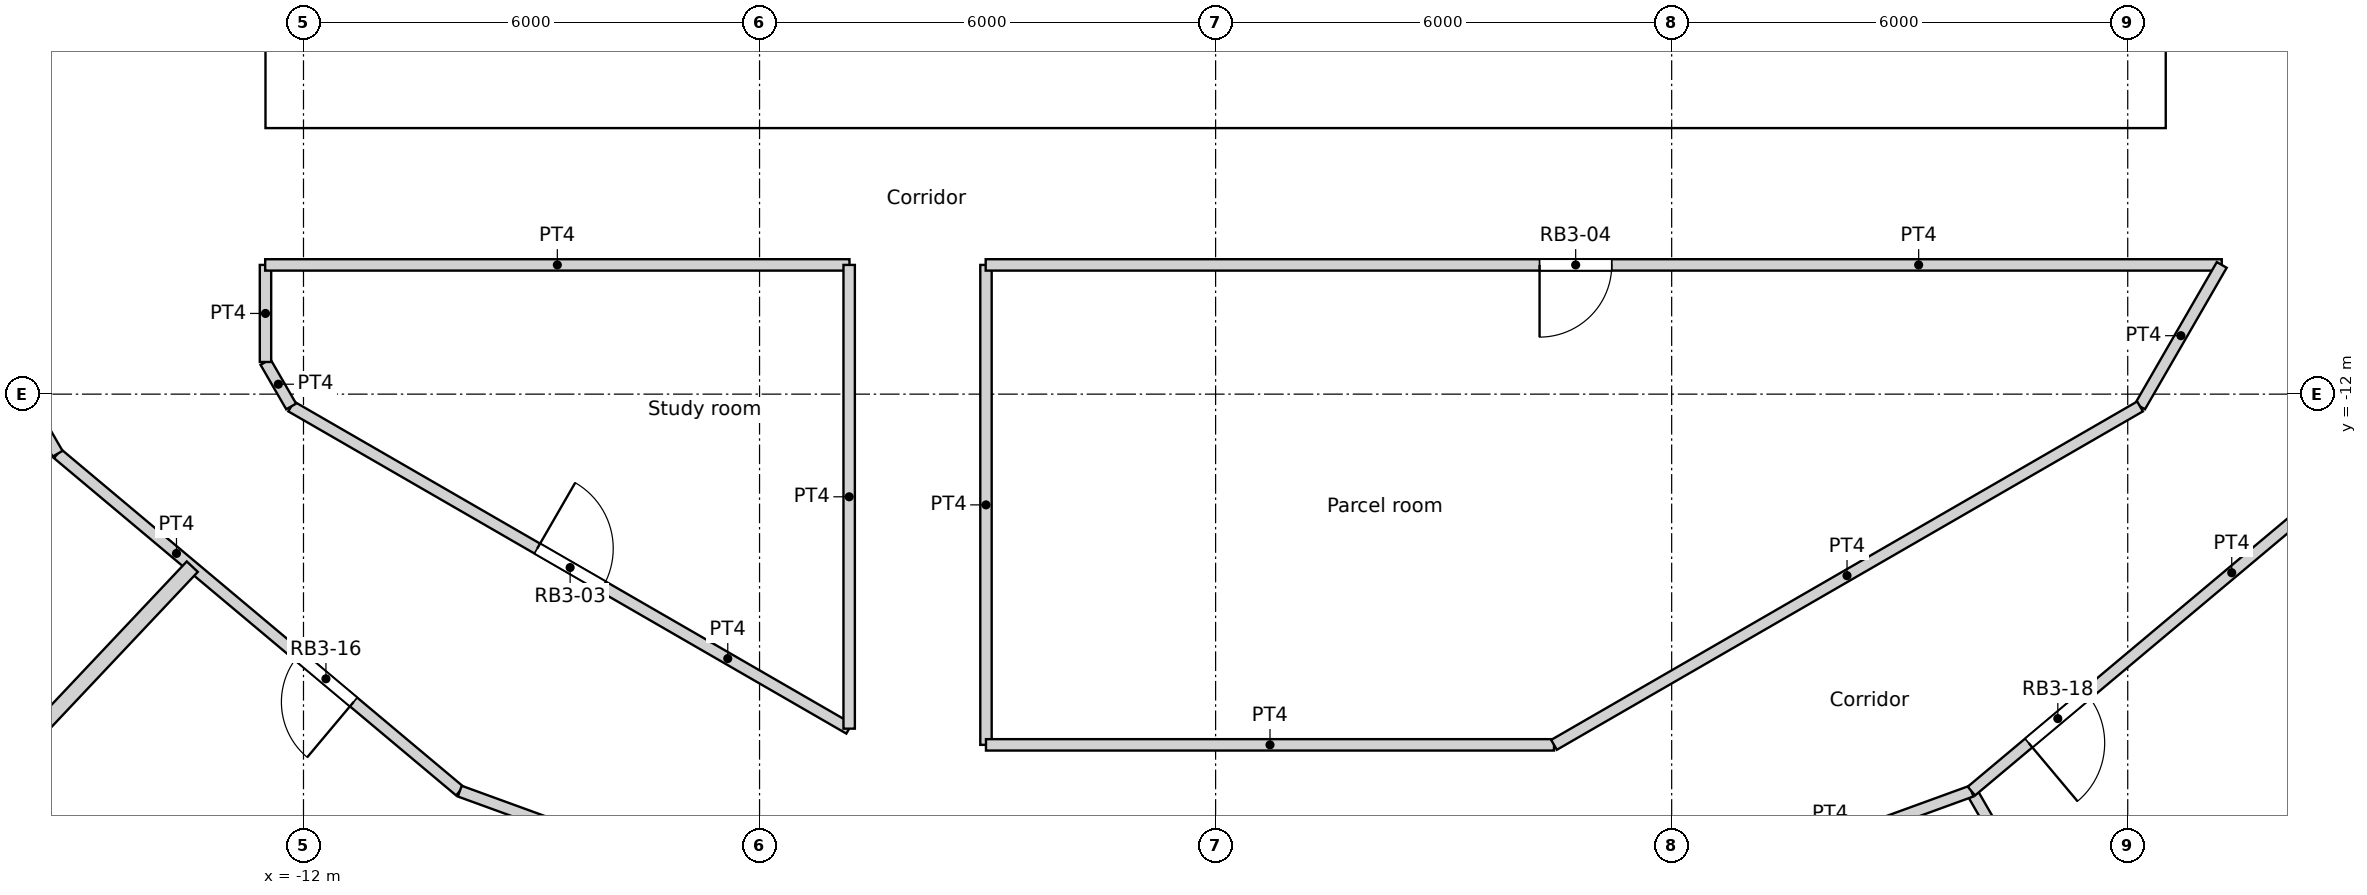
"""IFC4 building model, lengths in metres.
Left out: names, types, materials, properties, quantities, classifications, styles, units other than length and angle.
Written with IfcOpenShell. Run it as: python <this file> out.ifc"""

import sys

from ifc_helpers import new_model, si_unit, direction, frame, frame_2d, origin, origin_2d, place, context, subcontext, project, spatial, rectangle, circle, extrude, element, fill, save


model = new_model("IFC4")
c1 = context("Model", 3, precision=1e-05, world=origin(), true_north=direction((0.0, 1.0)))
c2 = subcontext(c1, "Body", "Model", "MODEL_VIEW")
j1 = project(units=[si_unit("LENGTHUNIT", "METRE"), si_unit("PLANEANGLEUNIT", "RADIAN")], contexts=[c1])
p1 = place(None, origin())
s1 = spatial("IfcSite", under=j1, at=p1, CompositionType="ELEMENT")
p2 = place(p1, origin())
s2 = spatial("IfcBuilding", under=s1, at=p2, CompositionType="ELEMENT")
p3 = place(p2, frame((0.0, 0.0, 147.6)))
s3 = spatial("IfcBuildingStorey", under=s2, at=p3, CompositionType="ELEMENT", Elevation=147.6)
for number, where, z_axis, x_axis in (
    (1, (-13.798, -12.802, 0.0), (0.0, 0.0, 1.0), (1.0, 0.0, 0.0)),
    (2, (-9.411, -16.301, 0.0), (0.0, 0.0, 1.0), (1.0, 0.0, 0.0)),
    (3, (6.876, -17.521, 0.0), (0.0, 0.0, 1.0), (1.0, 0.0, 0.0)),
    (4, (11.735, -14.716, 0.0), (0.0, 0.0, 1.0), (1.0, 0.0, 0.0)),
):
    element("IfcColumn", number, at=place(p3, frame(where, z_axis=z_axis, x_axis=x_axis)), inside=s3, PredefinedType="COLUMN", context=c2, shape_type="SweptSolid", body=[
        extrude(circle(Radius=0.65, at=origin_2d()), origin(), (0.0, 0.0, 1.0), 3.6),
    ])
p4 = place(p3, frame((-12.5, -8.05, 0.0), z_axis=(0.0, 0.0, 1.0), x_axis=(1.0, 0.0, 0.0)))
e5 = element("IfcWall", 5, at=p4, inside=s3, PredefinedType="SOLIDWALL", context=c2, shape_type="SweptSolid", body=[
    extrude(rectangle(XDim=25.0, YDim=0.9, at=frame_2d((12.5, 0.0))), origin(), (0.0, 0.0, 1.0), 3.6),
])
p5 = place(p4, frame((13.4, 0.0, 0.0)))
e6 = element("IfcOpeningElement", 6, at=p5, cuts=e5, PredefinedType="OPENING", context=c2, shape_type="SweptSolid", body=[
    extrude(rectangle(XDim=1.0, YDim=2.1, at=frame_2d((0.5, 1.05))), frame((0.0, 0.45, 0.0), z_axis=(0.0, -1.0, 0.0), x_axis=(1.0, 0.0, 0.0)), (0.0, 0.0, 1.0), 0.9),
])
p6 = place(p4, frame((8.3, 0.0, 0.0)))
e7 = element("IfcOpeningElement", 7, at=p6, cuts=e5, PredefinedType="OPENING", context=c2, shape_type="SweptSolid", body=[
    extrude(rectangle(XDim=1.8, YDim=2.1, at=frame_2d((0.9, 1.05))), frame((0.0, 0.45, 0.0), z_axis=(0.0, -1.0, 0.0), x_axis=(1.0, 0.0, 0.0)), (0.0, 0.0, 1.0), 0.9),
])
p7 = place(p4, frame((14.9, 0.0, 0.0)))
e8 = element("IfcOpeningElement", 8, at=p7, cuts=e5, PredefinedType="OPENING", context=c2, shape_type="SweptSolid", body=[
    extrude(rectangle(XDim=1.8, YDim=2.1, at=frame_2d((0.9, 1.05))), frame((0.0, 0.45, 0.0), z_axis=(0.0, -1.0, 0.0), x_axis=(1.0, 0.0, 0.0)), (0.0, 0.0, 1.0), 0.9),
])
p8 = place(p3, frame((-12.05, -7.6, 0.0), z_axis=(0.0, 0.0, 1.0), x_axis=(0.0, 1.0, 0.0)))
e9 = element("IfcWall", 9, at=p8, inside=s3, PredefinedType="SOLIDWALL", context=c2, shape_type="SweptSolid", body=[
    extrude(rectangle(XDim=15.2, YDim=0.9, at=frame_2d((7.6, 0.0))), origin(), (0.0, 0.0, 1.0), 3.6),
])
p9 = place(p8, frame((7.1, 0.0, 0.0)))
e10 = element("IfcOpeningElement", 10, at=p9, cuts=e9, PredefinedType="OPENING", context=c2, shape_type="SweptSolid", body=[
    extrude(rectangle(XDim=1.0, YDim=2.1, at=frame_2d((0.5, 1.05))), frame((0.0, 0.45, 0.0), z_axis=(0.0, -1.0, 0.0), x_axis=(1.0, 0.0, 0.0)), (0.0, 0.0, 1.0), 0.9),
])
p10 = place(p3, frame((12.05, -7.6, 0.0), z_axis=(0.0, 0.0, 1.0), x_axis=(0.0, 1.0, 0.0)))
e11 = element("IfcWall", 11, at=p10, inside=s3, PredefinedType="SOLIDWALL", context=c2, shape_type="SweptSolid", body=[
    extrude(rectangle(XDim=15.2, YDim=0.9, at=frame_2d((7.6, 0.0))), origin(), (0.0, 0.0, 1.0), 3.6),
])
p11 = place(p10, frame((5.1, 0.0, 0.0)))
e12 = element("IfcOpeningElement", 12, at=p11, cuts=e11, PredefinedType="OPENING", context=c2, shape_type="SweptSolid", body=[
    extrude(rectangle(XDim=1.0, YDim=2.1, at=frame_2d((0.5, 1.05))), frame((0.0, 0.45, 0.0), z_axis=(0.0, -1.0, 0.0), x_axis=(1.0, 0.0, 0.0)), (0.0, 0.0, 1.0), 0.9),
])
for number, where, z_axis, x_axis in (
    (13, (0.55, -7.6, 0.0), (0.0, 0.0, 1.0), (0.0, 1.0, 0.0)),
    (14, (2.25, -7.6, 0.0), (0.0, 0.0, 1.0), (0.0, 1.0, 0.0)),
):
    element("IfcWall", number, at=place(p3, frame(where, z_axis=z_axis, x_axis=x_axis)), inside=s3, PredefinedType="SOLIDWALL", context=c2, shape_type="SweptSolid", body=[
        extrude(rectangle(XDim=4.35, YDim=0.3, at=frame_2d((2.175, 0.0))), origin(), (0.0, 0.0, 1.0), 3.3),
    ])
p12 = place(p3, frame((-9.05, -7.15, 0.0), z_axis=(0.0, 0.0, 1.0), x_axis=(1.0, 0.0, 0.0)))
e15 = element("IfcWall", 15, at=p12, inside=s3, PredefinedType="SOLIDWALL", context=c2, shape_type="SweptSolid", body=[
    extrude(rectangle(XDim=4.85, YDim=0.9, at=frame_2d((2.425, 0.0))), origin(), (0.0, 0.0, 1.0), 3.3),
])
p13 = place(p3, frame((-2.4, -7.15, 0.0), z_axis=(0.0, 0.0, 1.0), x_axis=(1.0, 0.0, 0.0)))
e16 = element("IfcWall", 16, at=p13, inside=s3, PredefinedType="SOLIDWALL", context=c2, shape_type="SweptSolid", body=[
    extrude(rectangle(XDim=2.8, YDim=0.9, at=frame_2d((1.4, 0.0))), origin(), (0.0, 0.0, 1.0), 3.3),
])
p14 = place(p3, frame((4.2, -7.15, 0.0), z_axis=(0.0, 0.0, 1.0), x_axis=(1.0, 0.0, 0.0)))
e17 = element("IfcWall", 17, at=p14, inside=s3, PredefinedType="SOLIDWALL", context=c2, shape_type="SweptSolid", body=[
    extrude(rectangle(XDim=4.85, YDim=0.9, at=frame_2d((2.425, 0.0))), origin(), (0.0, 0.0, 1.0), 3.3),
])
p15 = place(p3, frame((-12.504, -10.3, 0.0), z_axis=(0.0, 0.0, 1.0), x_axis=(1.0, 0.0, 0.0)))
e18 = element("IfcWall", 18, at=p15, inside=s3, PredefinedType="PARTITIONING", context=c2, shape_type="SweptSolid", body=[
    extrude(rectangle(XDim=7.687, YDim=0.15, at=frame_2d((3.844, 0.0))), origin(), (0.0, 0.0, 1.0), 3.3),
])
p16 = place(p3, frame((-3.025, -10.3, 0.0), z_axis=(0.0, 0.0, 1.0), x_axis=(1.0, 0.0, 0.0)))
e19 = element("IfcWall", 19, at=p16, inside=s3, PredefinedType="PARTITIONING", context=c2, shape_type="SweptSolid", body=[
    extrude(rectangle(XDim=16.262, YDim=0.15, at=frame_2d((8.131, 0.0))), origin(), (0.0, 0.0, 1.0), 3.3),
])
p17 = place(p16, frame((7.287, 0.0, 0.0)))
e20 = element("IfcOpeningElement", 20, at=p17, cuts=e19, PredefinedType="OPENING", context=c2, shape_type="SweptSolid", body=[
    extrude(rectangle(XDim=0.95, YDim=2.1, at=frame_2d((0.475, 1.05))), frame((0.0, 0.075, 0.0), z_axis=(0.0, -1.0, 0.0), x_axis=(1.0, 0.0, 0.0)), (0.0, 0.0, 1.0), 0.15),
])
p18 = place(p3, frame((12.162, -12.162, 0.0), z_axis=(0.0, 0.0, 1.0), x_axis=(0.499961633463, 0.866047553582, 0.0)))
e21 = element("IfcWall", 21, at=p18, inside=s3, PredefinedType="PARTITIONING", context=c2, shape_type="SweptSolid", body=[
    extrude(rectangle(XDim=2.15, YDim=0.15, at=frame_2d((1.075, 0.0))), origin(), (0.0, 0.0, 1.0), 3.3),
])
p19 = place(p3, frame((9.943, -17.222, 0.0), z_axis=(0.0, 0.0, 1.0), x_axis=(0.766192104565, 0.642611592567, 0.0)))
e22 = element("IfcWall", 22, at=p19, inside=s3, PredefinedType="PARTITIONING", context=c2, shape_type="SweptSolid", body=[
    extrude(rectangle(XDim=6.906, YDim=0.15, at=frame_2d((3.453, 0.0))), origin(), (0.0, 0.0, 1.0), 3.3),
])
p20 = place(p19, frame((0.984, 0.0, 0.0)))
e23 = element("IfcOpeningElement", 23, at=p20, cuts=e22, PredefinedType="OPENING", context=c2, shape_type="SweptSolid", body=[
    extrude(rectangle(XDim=1.0, YDim=2.04, at=frame_2d((0.5, 1.02))), frame((0.0, 0.075, 0.0), z_axis=(0.0, -1.0, 0.0), x_axis=(1.0, 0.0, 0.0)), (0.0, 0.0, 1.0), 0.15),
])
p21 = place(p3, frame((-12.5, -11.577, 0.0), z_axis=(0.0, 0.0, 1.0), x_axis=(0.0, 1.0, 0.0)))
e24 = element("IfcWall", 24, at=p21, inside=s3, PredefinedType="PARTITIONING", context=c2, shape_type="SweptSolid", body=[
    extrude(rectangle(XDim=1.277, YDim=0.15, at=frame_2d((0.638, 0.0))), origin(), (0.0, 0.0, 1.0), 3.3),
])
p22 = place(p3, frame((-12.5, -11.577, 0.0), z_axis=(0.0, 0.0, 1.0), x_axis=(0.500024767483, -0.866011103799, 0.0)))
e25 = element("IfcWall", 25, at=p22, inside=s3, PredefinedType="PARTITIONING", context=c2, shape_type="SweptSolid", body=[
    extrude(rectangle(XDim=0.676, YDim=0.15, at=frame_2d((0.338, 0.0))), origin(), (0.0, 0.0, 1.0), 3.3),
])
p23 = place(p3, frame((-15.235, -12.784, 0.0), z_axis=(0.0, 0.0, 1.0), x_axis=(0.766192104565, -0.642611592567, 0.0)))
e26 = element("IfcWall", 26, at=p23, inside=s3, PredefinedType="PARTITIONING", context=c2, shape_type="SweptSolid", body=[
    extrude(rectangle(XDim=6.906, YDim=0.15, at=frame_2d((3.453, 0.0))), origin(), (0.0, 0.0, 1.0), 3.3),
])
p24 = place(p23, frame((4.133, 0.0, 0.0)))
e27 = element("IfcOpeningElement", 27, at=p24, cuts=e26, PredefinedType="OPENING", context=c2, shape_type="SweptSolid", body=[
    extrude(rectangle(XDim=0.95, YDim=2.1, at=frame_2d((0.475, 1.05))), frame((0.0, 0.075, 0.0), z_axis=(0.0, -1.0, 0.0), x_axis=(1.0, 0.0, 0.0)), (0.0, 0.0, 1.0), 0.15),
])
p25 = place(p3, frame((-18.688, -6.802, 0.0), z_axis=(0.0, 0.0, 1.0), x_axis=(0.499914202267, -0.866074933462, 0.0)))
e28 = element("IfcWall", 28, at=p25, inside=s3, PredefinedType="PARTITIONING", context=c2, shape_type="SweptSolid", body=[
    extrude(rectangle(XDim=6.907, YDim=0.15, at=frame_2d((3.454, 0.0))), origin(), (0.0, 0.0, 1.0), 3.3),
])
p26 = place(p25, frame((3.028, 0.0, 0.0)))
e29 = element("IfcOpeningElement", 29, at=p26, cuts=e28, PredefinedType="OPENING", context=c2, shape_type="SweptSolid", body=[
    extrude(rectangle(XDim=0.95, YDim=2.1, at=frame_2d((0.475, 1.05))), frame((0.0, 0.075, 0.0), z_axis=(0.0, -1.0, 0.0), x_axis=(1.0, 0.0, 0.0)), (0.0, 0.0, 1.0), 0.15),
])
p27 = place(p3, frame((-12.162, -12.162, 0.0), z_axis=(0.0, 0.0, 1.0), x_axis=(0.866004766557, -0.500035743023, 0.0)))
e30 = element("IfcWall", 30, at=p27, inside=s3, PredefinedType="PARTITIONING", context=c2, shape_type="SweptSolid", body=[
    extrude(rectangle(XDim=8.477, YDim=0.15, at=frame_2d((4.239, 0.0))), origin(), (0.0, 0.0, 1.0), 3.3),
])
p28 = place(p27, frame((3.738, 0.0, 0.0)))
e31 = element("IfcOpeningElement", 31, at=p28, cuts=e30, PredefinedType="OPENING", context=c2, shape_type="SweptSolid", body=[
    extrude(rectangle(XDim=1.0, YDim=2.04, at=frame_2d((0.5, 1.02))), frame((0.0, 0.075, 0.0), z_axis=(0.0, -1.0, 0.0), x_axis=(1.0, 0.0, 0.0)), (0.0, 0.0, 1.0), 0.15),
])
p29 = place(p3, frame((-4.821, -16.401, 0.0), z_axis=(0.0, 0.0, 1.0), x_axis=(0.0, 1.0, 0.0)))
e32 = element("IfcWall", 32, at=p29, inside=s3, PredefinedType="PARTITIONING", context=c2, shape_type="SweptSolid", body=[
    extrude(rectangle(XDim=6.101, YDim=0.15, at=frame_2d((3.05, 0.0))), origin(), (0.0, 0.0, 1.0), 3.3),
])
p30 = place(p3, frame((-3.021, -16.614, 0.0), z_axis=(0.0, 0.0, 1.0), x_axis=(0.0, 1.0, 0.0)))
e33 = element("IfcWall", 33, at=p30, inside=s3, PredefinedType="PARTITIONING", context=c2, shape_type="SweptSolid", body=[
    extrude(rectangle(XDim=6.314, YDim=0.15, at=frame_2d((3.157, 0.0))), origin(), (0.0, 0.0, 1.0), 3.3),
])
p31 = place(p3, frame((-3.021, -16.614, 0.0), z_axis=(0.0, 0.0, 1.0), x_axis=(1.0, 0.0, 0.0)))
e34 = element("IfcWall", 34, at=p31, inside=s3, PredefinedType="PARTITIONING", context=c2, shape_type="SweptSolid", body=[
    extrude(rectangle(XDim=7.473, YDim=0.15, at=frame_2d((3.736, 0.0))), origin(), (0.0, 0.0, 1.0), 3.3),
])
p32 = place(p3, frame((4.452, -16.614, 0.0), z_axis=(0.0, 0.0, 1.0), x_axis=(0.866005203721, 0.500034985904, 0.0)))
e35 = element("IfcWall", 35, at=p32, inside=s3, PredefinedType="PARTITIONING", context=c2, shape_type="SweptSolid", body=[
    extrude(rectangle(XDim=8.903, YDim=0.15, at=frame_2d((4.452, 0.0))), origin(), (0.0, 0.0, 1.0), 3.3),
])
p33 = place(p3, frame((-9.944, -17.223, 0.0), z_axis=(0.0, 0.0, 1.0), x_axis=(0.939737689664, -0.341896292208, 0.0)))
e36 = element("IfcWall", 36, at=p33, inside=s3, PredefinedType="PARTITIONING", context=c2, shape_type="SweptSolid", body=[
    extrude(rectangle(XDim=6.908, YDim=0.15, at=frame_2d((3.454, 0.0))), origin(), (0.0, 0.0, 1.0), 3.3),
])
p34 = place(p3, frame((3.453, -19.586, 0.0), z_axis=(0.0, 0.0, 1.0), x_axis=(0.939672634566, 0.342075050021, 0.0)))
e37 = element("IfcWall", 37, at=p34, inside=s3, PredefinedType="PARTITIONING", context=c2, shape_type="SweptSolid", body=[
    extrude(rectangle(XDim=6.908, YDim=0.15, at=frame_2d((3.454, 0.0))), origin(), (0.0, 0.0, 1.0), 3.3),
])
p35 = place(p34, frame((1.904, 0.0, 0.0)))
e38 = element("IfcOpeningElement", 38, at=p35, cuts=e37, PredefinedType="OPENING", context=c2, shape_type="SweptSolid", body=[
    extrude(rectangle(XDim=1.0, YDim=2.04, at=frame_2d((0.5, 1.02))), frame((0.0, 0.075, 0.0), z_axis=(0.0, -1.0, 0.0), x_axis=(1.0, 0.0, 0.0)), (0.0, 0.0, 1.0), 0.15),
])
p36 = place(p3, frame((-17.497, -18.546, 0.0), z_axis=(0.0, 0.0, 1.0), x_axis=(0.6862502776, 0.72736549031, 0.0)))
e39 = element("IfcWall", 39, at=p36, inside=s3, PredefinedType="PARTITIONING", context=c2, shape_type="SweptSolid", body=[
    extrude(rectangle(XDim=5.879, YDim=0.2, at=frame_2d((2.939, 0.0))), origin(), (0.0, 0.0, 1.0), 3.3),
])
p37 = place(p3, frame((9.944, -17.223, 0.0), z_axis=(0.0, 0.0, 1.0), x_axis=(0.500010020406, -0.866019618423, 0.0)))
e40 = element("IfcWall", 40, at=p37, inside=s3, PredefinedType="PARTITIONING", context=c2, shape_type="SweptSolid", body=[
    extrude(rectangle(XDim=5.61, YDim=0.15, at=frame_2d((2.805, 0.0))), origin(), (0.0, 0.0, 1.0), 3.3),
])
p38 = place(p5, origin())
e41 = element("IfcDoor", 41, at=p38, inside=s3, OperationType="SINGLE_SWING_LEFT", PredefinedType="DOOR", context=c2, shape_type="SweptSolid", body=[
    extrude(rectangle(XDim=1.0, YDim=2.1, at=frame_2d((0.5, 1.05))), frame((0.0, 0.025, 0.0), z_axis=(0.0, -1.0, 0.0), x_axis=(1.0, 0.0, 0.0)), (0.0, 0.0, 1.0), 0.05),
])
fill(e6, e41)
p39 = place(p6, origin())
e42 = element("IfcDoor", 42, at=p39, inside=s3, OperationType="DOUBLE_DOOR_SINGLE_SWING", PredefinedType="DOOR", context=c2, shape_type="SweptSolid", body=[
    extrude(rectangle(XDim=1.8, YDim=2.1, at=frame_2d((0.9, 1.05))), frame((0.0, 0.025, 0.0), z_axis=(0.0, -1.0, 0.0), x_axis=(1.0, 0.0, 0.0)), (0.0, 0.0, 1.0), 0.05),
])
fill(e7, e42)
p40 = place(p7, origin())
e43 = element("IfcDoor", 43, at=p40, inside=s3, OperationType="DOUBLE_DOOR_SINGLE_SWING", PredefinedType="DOOR", context=c2, shape_type="SweptSolid", body=[
    extrude(rectangle(XDim=1.8, YDim=2.1, at=frame_2d((0.9, 1.05))), frame((0.0, 0.025, 0.0), z_axis=(0.0, -1.0, 0.0), x_axis=(1.0, 0.0, 0.0)), (0.0, 0.0, 1.0), 0.05),
])
fill(e8, e43)
p41 = place(p28, origin())
e44 = element("IfcDoor", 44, at=p41, inside=s3, OperationType="SINGLE_SWING_LEFT", PredefinedType="DOOR", context=c2, shape_type="SweptSolid", body=[
    extrude(rectangle(XDim=1.0, YDim=2.04, at=frame_2d((0.5, 1.02))), frame((0.0, 0.025, 0.0), z_axis=(0.0, -1.0, 0.0), x_axis=(1.0, 0.0, 0.0)), (0.0, 0.0, 1.0), 0.05),
])
fill(e31, e44)
p42 = place(p17, origin())
e45 = element("IfcDoor", 45, at=p42, inside=s3, OperationType="SINGLE_SWING_RIGHT", PredefinedType="DOOR", context=c2, shape_type="SweptSolid", body=[
    extrude(rectangle(XDim=0.95, YDim=2.1, at=frame_2d((0.475, 1.05))), frame((0.0, 0.025, 0.0), z_axis=(0.0, -1.0, 0.0), x_axis=(1.0, 0.0, 0.0)), (0.0, 0.0, 1.0), 0.05),
])
fill(e20, e45)
p43 = place(p24, origin())
e46 = element("IfcDoor", 46, at=p43, inside=s3, OperationType="SINGLE_SWING_LEFT", PredefinedType="DOOR", context=c2, shape_type="SweptSolid", body=[
    extrude(rectangle(XDim=0.95, YDim=2.1, at=frame_2d((0.475, 1.05))), frame((0.0, 0.025, 0.0), z_axis=(0.0, -1.0, 0.0), x_axis=(1.0, 0.0, 0.0)), (0.0, 0.0, 1.0), 0.05),
])
fill(e27, e46)
p44 = place(p20, origin())
e47 = element("IfcDoor", 47, at=p44, inside=s3, OperationType="SINGLE_SWING_RIGHT", PredefinedType="DOOR", context=c2, shape_type="SweptSolid", body=[
    extrude(rectangle(XDim=1.0, YDim=2.04, at=frame_2d((0.5, 1.02))), frame((0.0, 0.025, 0.0), z_axis=(0.0, -1.0, 0.0), x_axis=(1.0, 0.0, 0.0)), (0.0, 0.0, 1.0), 0.05),
])
fill(e23, e47)
save(model, sys.argv[1])
